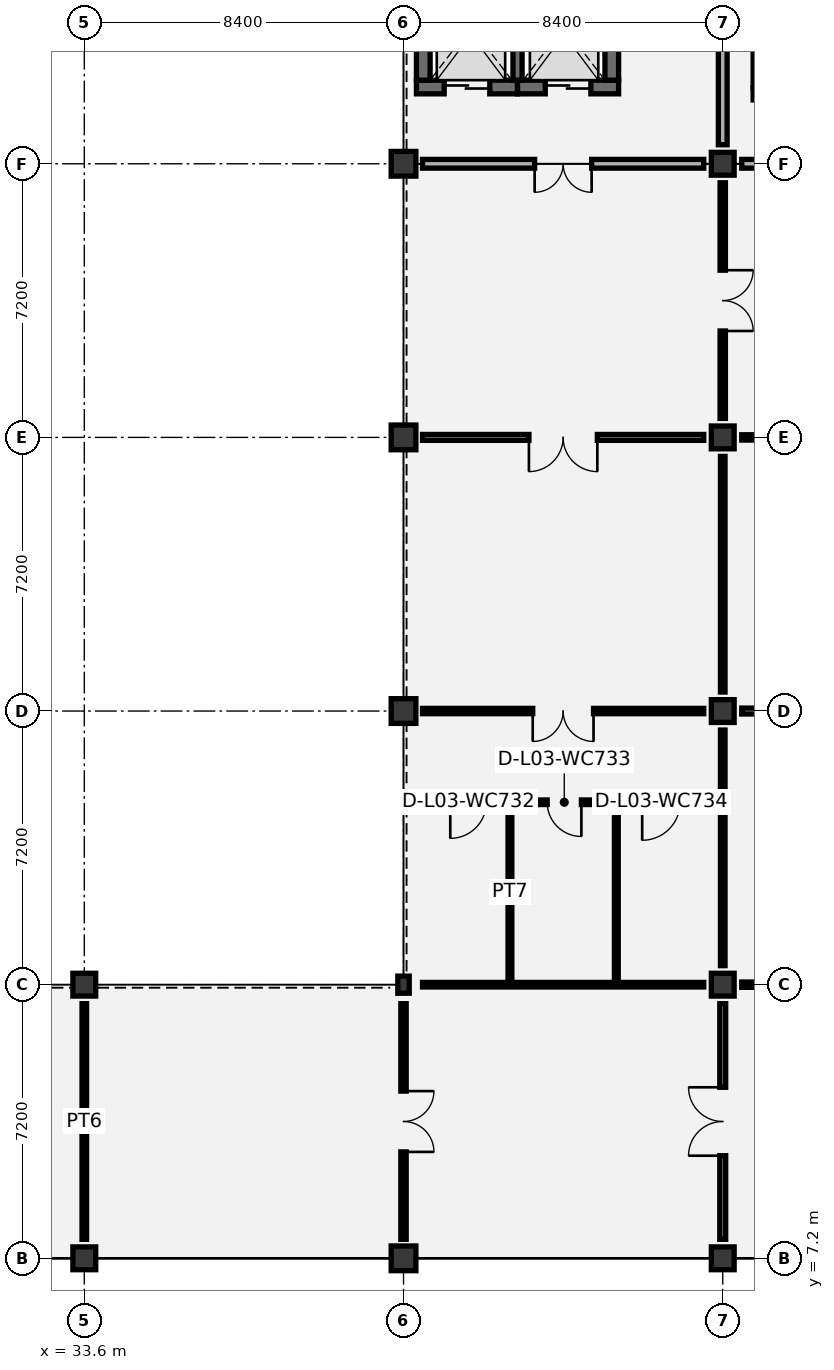
"""IFC4 building model, lengths in metres.
Left out: names, types, materials, properties, quantities, classifications, styles, units other than length and angle.
Written with IfcOpenShell. Run it as: python <this file> out.ifc"""

import sys

from ifc_helpers import new_model, si_unit, direction, frame, frame_2d, origin, origin_2d, place, context, subcontext, project, spatial, rectangle, i_section, extrude, element, fill, save


model = new_model("IFC4")
c1 = context("Model", 3, precision=1e-05, world=origin(), true_north=direction((0.0, 1.0)))
c2 = subcontext(c1, "Body", "Model", "MODEL_VIEW")
j1 = project(units=[si_unit("LENGTHUNIT", "METRE"), si_unit("PLANEANGLEUNIT", "RADIAN")], contexts=[c1])
p1 = place(None, origin())
s1 = spatial("IfcSite", under=j1, at=p1, CompositionType="ELEMENT")
p2 = place(p1, origin())
s2 = spatial("IfcBuilding", under=s1, at=p2, CompositionType="ELEMENT")
p3 = place(p2, frame((0.0, 0.0, 16.8)))
s3 = spatial("IfcBuildingStorey", under=s2, at=p3, CompositionType="ELEMENT", Elevation=16.8)
for number, where, z_axis, x_axis in (
    (1, (33.6, 7.2, 0.0), (0.0, 0.0, 1.0), (1.0, 0.0, 0.0)),
    (2, (33.6, 14.4, 0.0), (0.0, 0.0, 1.0), (1.0, 0.0, 0.0)),
):
    element("IfcColumn", number, at=place(p3, frame(where, z_axis=z_axis, x_axis=x_axis)), inside=s3, PredefinedType="COLUMN", context=c2, shape_type="SweptSolid", body=[
        extrude(rectangle(XDim=0.6, YDim=0.6, at=origin_2d()), origin(), (0.0, 0.0, 1.0), 5.05),
    ])
p4 = place(p3, frame((42.0, 7.2, 0.0), z_axis=(0.0, 0.0, 1.0), x_axis=(1.0, 0.0, 0.0)))
e3 = element("IfcColumn", 3, at=p4, inside=s3, PredefinedType="COLUMN", context=c2, shape_type="SweptSolid", body=[
    extrude(rectangle(XDim=0.65, YDim=0.65, at=origin_2d()), origin(), (0.0, 0.0, 1.0), 5.4),
])
p5 = place(p3, frame((42.0, 14.4, 0.0), z_axis=(0.0, 0.0, 1.0), x_axis=(1.0, 0.0, 0.0)))
e4 = element("IfcColumn", 4, at=p5, inside=s3, PredefinedType="COLUMN", context=c2, shape_type="SweptSolid", body=[
    extrude(i_section(OverallWidth=0.3, OverallDepth=0.45, WebThickness=0.014, FlangeThickness=0.026, FilletRadius=0.027, at=origin_2d()), origin(), (0.0, 0.0, 1.0), 5.4),
])
for number, where, z_axis, x_axis in (
    (5, (42.0, 21.6, 0.0), (0.0, 0.0, 1.0), (1.0, 0.0, 0.0)),
    (6, (42.0, 28.8, 0.0), (0.0, 0.0, 1.0), (1.0, 0.0, 0.0)),
    (7, (42.0, 36.0, 0.0), (0.0, 0.0, 1.0), (1.0, 0.0, 0.0)),
):
    element("IfcColumn", number, at=place(p3, frame(where, z_axis=z_axis, x_axis=x_axis)), inside=s3, PredefinedType="COLUMN", context=c2, shape_type="SweptSolid", body=[
        extrude(rectangle(XDim=0.65, YDim=0.65, at=origin_2d()), origin(), (0.0, 0.0, 1.0), 5.4),
    ])
for number, where, z_axis, x_axis in (
    (8, (50.4, 7.2, 0.0), (0.0, 0.0, 1.0), (1.0, 0.0, 0.0)),
    (9, (50.4, 14.4, 0.0), (0.0, 0.0, 1.0), (1.0, 0.0, 0.0)),
    (10, (50.4, 21.6, 0.0), (0.0, 0.0, 1.0), (1.0, 0.0, 0.0)),
    (11, (50.4, 28.8, 0.0), (0.0, 0.0, 1.0), (1.0, 0.0, 0.0)),
    (12, (50.4, 36.0, 0.0), (0.0, 0.0, 1.0), (1.0, 0.0, 0.0)),
):
    element("IfcColumn", number, at=place(p3, frame(where, z_axis=z_axis, x_axis=x_axis)), inside=s3, PredefinedType="COLUMN", context=c2, shape_type="SweptSolid", body=[
        extrude(rectangle(XDim=0.6, YDim=0.6, at=origin_2d()), origin(), (0.0, 0.0, 1.0), 5.05),
    ])
p6 = place(p3, frame((51.2, 37.84, 0.0), z_axis=(0.0, 0.0, 1.0), x_axis=(1.0, 0.0, 0.0)))
e13 = element("IfcWall", 13, at=p6, inside=s3, PredefinedType="SHEAR", context=c2, shape_type="SweptSolid", body=[
    extrude(rectangle(XDim=7.48, YDim=0.32, at=frame_2d((3.74, 0.0))), origin(), (0.0, 0.0, 1.0), 4.825),
])
p7 = place(p6, frame((0.45, 0.0, 0.0)))
e14 = element("IfcOpeningElement", 14, at=p7, cuts=e13, PredefinedType="OPENING", context=c2, shape_type="SweptSolid", body=[
    extrude(rectangle(XDim=1.05, YDim=2.15, at=frame_2d((0.525, 1.075))), frame((0.0, 0.17, 0.0), z_axis=(0.0, -1.0, 0.0), x_axis=(1.0, 0.0, 0.0)), (0.0, 0.0, 1.0), 0.34),
])
p8 = place(p3, frame((51.36, 38.0, 0.0), z_axis=(0.0, 0.0, 1.0), x_axis=(0.0, 1.0, 0.0)))
e15 = element("IfcWall", 15, at=p8, inside=s3, PredefinedType="SHEAR", context=c2, shape_type="SweptSolid", body=[
    extrude(rectangle(XDim=3.8, YDim=0.32, at=frame_2d((1.9, 0.0))), origin(), (0.0, 0.0, 1.0), 4.825),
])
p9 = place(p3, frame((42.34, 38.02, 0.0), z_axis=(0.0, 0.0, 1.0), x_axis=(1.0, 0.0, 0.0)))
e16 = element("IfcWall", 16, at=p9, inside=s3, PredefinedType="SHEAR", context=c2, shape_type="SweptSolid", body=[
    extrude(rectangle(XDim=2.66, YDim=0.36, at=frame_2d((1.33, 0.0))), origin(), (0.0, 0.0, 1.0), 6.5),
])
p10 = place(p9, frame((0.73, 0.0, 0.0)))
e17 = element("IfcOpeningElement", 17, at=p10, cuts=e16, PredefinedType="OPENING", context=c2, shape_type="SweptSolid", body=[
    extrude(rectangle(XDim=1.2, YDim=2.15, at=frame_2d((0.6, 1.075))), frame((0.0, 0.19, 0.0), z_axis=(0.0, -1.0, 0.0), x_axis=(1.0, 0.0, 0.0)), (0.0, 0.0, 1.0), 0.38),
])
p11 = place(p3, frame((45.0, 38.02, 0.0), z_axis=(0.0, 0.0, 1.0), x_axis=(1.0, 0.0, 0.0)))
e18 = element("IfcWall", 18, at=p11, inside=s3, PredefinedType="SHEAR", context=c2, shape_type="SweptSolid", body=[
    extrude(rectangle(XDim=2.66, YDim=0.36, at=frame_2d((1.33, 0.0))), origin(), (0.0, 0.0, 1.0), 6.5),
])
p12 = place(p11, frame((0.73, 0.0, 0.0)))
e19 = element("IfcOpeningElement", 19, at=p12, cuts=e18, PredefinedType="OPENING", context=c2, shape_type="SweptSolid", body=[
    extrude(rectangle(XDim=1.2, YDim=2.15, at=frame_2d((0.6, 1.075))), frame((0.0, 0.19, 0.0), z_axis=(0.0, -1.0, 0.0), x_axis=(1.0, 0.0, 0.0)), (0.0, 0.0, 1.0), 0.38),
])
for number, where, z_axis, x_axis in (
    (20, (42.52, 38.2, 0.0), (0.0, 0.0, 1.0), (0.0, 1.0, 0.0)),
    (21, (47.48, 38.2, 0.0), (0.0, 0.0, 1.0), (0.0, 1.0, 0.0)),
):
    element("IfcWall", number, at=place(p3, frame(where, z_axis=z_axis, x_axis=x_axis)), inside=s3, PredefinedType="SHEAR", context=c2, shape_type="SweptSolid", body=[
        extrude(rectangle(XDim=2.8, YDim=0.36, at=frame_2d((1.4, 0.0))), origin(), (0.0, 0.0, 1.0), 6.5),
    ])
p13 = place(p3, frame((45.0, 38.2, 0.0), z_axis=(0.0, 0.0, 1.0), x_axis=(0.0, 1.0, 0.0)))
e22 = element("IfcWall", 22, at=p13, inside=s3, PredefinedType="SHEAR", context=c2, shape_type="SweptSolid", body=[
    extrude(rectangle(XDim=2.8, YDim=0.24, at=frame_2d((1.4, 0.0))), origin(), (0.0, 0.0, 1.0), 6.5),
])
p14 = place(p3, frame((42.15, 19.2, 0.0), z_axis=(0.0, 0.0, 1.0), x_axis=(1.0, 0.0, 0.0)))
e23 = element("IfcWall", 23, at=p14, inside=s3, PredefinedType="PARTITIONING", context=c2, shape_type="SweptSolid", body=[
    extrude(rectangle(XDim=8.1, YDim=0.12, at=frame_2d((4.05, 0.0))), origin(), (0.0, 0.0, 1.0), 4.825),
])
p15 = place(p14, frame((1.08, 0.0, 0.0)))
e24 = element("IfcOpeningElement", 24, at=p15, cuts=e23, PredefinedType="OPENING", context=c2, shape_type="SweptSolid", body=[
    extrude(rectangle(XDim=0.95, YDim=2.1, at=frame_2d((0.475, 1.05))), frame((0.0, 0.07, 0.0), z_axis=(0.0, -1.0, 0.0), x_axis=(1.0, 0.0, 0.0)), (0.0, 0.0, 1.0), 0.14),
])
p16 = place(p14, frame((3.63, 0.0, 0.0)))
e25 = element("IfcOpeningElement", 25, at=p16, cuts=e23, PredefinedType="OPENING", context=c2, shape_type="SweptSolid", body=[
    extrude(rectangle(XDim=0.9, YDim=2.1, at=frame_2d((0.45, 1.05))), frame((0.0, 0.07, 0.0), z_axis=(0.0, -1.0, 0.0), x_axis=(1.0, 0.0, 0.0)), (0.0, 0.0, 1.0), 0.14),
])
p17 = place(p14, frame((6.13, 0.0, 0.0)))
e26 = element("IfcOpeningElement", 26, at=p17, cuts=e23, PredefinedType="OPENING", context=c2, shape_type="SweptSolid", body=[
    extrude(rectangle(XDim=1.0, YDim=2.1, at=frame_2d((0.5, 1.05))), frame((0.0, 0.07, 0.0), z_axis=(0.0, -1.0, 0.0), x_axis=(1.0, 0.0, 0.0)), (0.0, 0.0, 1.0), 0.14),
])
for number, where, z_axis, x_axis in (
    (27, (44.8, 14.55, 0.0), (0.0, 0.0, 1.0), (0.0, 1.0, 0.0)),
    (28, (47.6, 14.55, 0.0), (0.0, 0.0, 1.0), (0.0, 1.0, 0.0)),
):
    element("IfcWall", number, at=place(p3, frame(where, z_axis=z_axis, x_axis=x_axis)), inside=s3, PredefinedType="PARTITIONING", context=c2, shape_type="SweptSolid", body=[
        extrude(rectangle(XDim=4.59, YDim=0.1, at=frame_2d((2.295, 0.0))), origin(), (0.0, 0.0, 1.0), 4.825),
    ])
p18 = place(p3, frame((33.6, 7.7, 0.0), z_axis=(0.0, 0.0, 1.0), x_axis=(0.0, 1.0, 0.0)))
e29 = element("IfcWall", 29, at=p18, inside=s3, PredefinedType="PARTITIONING", context=c2, shape_type="SweptSolid", body=[
    extrude(rectangle(XDim=6.2, YDim=0.12, at=frame_2d((3.1, 0.0))), origin(), (0.0, 0.0, 1.0), 4.53),
])
p19 = place(p3, frame((42.0, 7.7, 0.0), z_axis=(0.0, 0.0, 1.0), x_axis=(0.0, 1.0, 0.0)))
e30 = element("IfcWall", 30, at=p19, inside=s3, PredefinedType="PARTITIONING", context=c2, shape_type="SweptSolid", body=[
    extrude(rectangle(XDim=6.2, YDim=0.14, at=frame_2d((3.1, 0.0))), origin(), (0.0, 0.0, 1.0), 4.12),
])
p20 = place(p19, frame((2.3, 0.0, 0.0)))
e31 = element("IfcOpeningElement", 31, at=p20, cuts=e30, PredefinedType="OPENING", context=c2, shape_type="SweptSolid", body=[
    extrude(rectangle(XDim=1.6, YDim=2.2, at=frame_2d((0.8, 1.1))), frame((0.0, 0.08, 0.0), z_axis=(0.0, -1.0, 0.0), x_axis=(1.0, 0.0, 0.0)), (0.0, 0.0, 1.0), 0.16),
])
p21 = place(p3, frame((50.4, 7.7, 0.0), z_axis=(0.0, 0.0, 1.0), x_axis=(0.0, 1.0, 0.0)))
e32 = element("IfcWall", 32, at=p21, inside=s3, PredefinedType="PARTITIONING", context=c2, shape_type="SweptSolid", body=[
    extrude(rectangle(XDim=6.2, YDim=0.155, at=frame_2d((3.1, 0.0))), origin(), (0.0, 0.0, 1.0), 4.32),
])
p22 = place(p21, frame((2.2, 0.0, 0.0)))
e33 = element("IfcOpeningElement", 33, at=p22, cuts=e32, PredefinedType="OPENING", context=c2, shape_type="SweptSolid", body=[
    extrude(rectangle(XDim=1.8, YDim=2.25, at=frame_2d((0.9, 1.125))), frame((0.0, 0.087, 0.0), z_axis=(0.0, -1.0, 0.0), x_axis=(1.0, 0.0, 0.0)), (0.0, 0.0, 1.0), 0.175),
])
p23 = place(p3, frame((42.5, 14.4, 0.0), z_axis=(0.0, 0.0, 1.0), x_axis=(1.0, 0.0, 0.0)))
e34 = element("IfcWall", 34, at=p23, inside=s3, PredefinedType="PARTITIONING", context=c2, shape_type="SweptSolid", body=[
    extrude(rectangle(XDim=7.4, YDim=0.12, at=frame_2d((3.7, 0.0))), origin(), (0.0, 0.0, 1.0), 4.07),
])
p24 = place(p3, frame((50.4, 14.9, 0.0), z_axis=(0.0, 0.0, 1.0), x_axis=(0.0, 1.0, 0.0)))
e35 = element("IfcWall", 35, at=p24, inside=s3, PredefinedType="PARTITIONING", context=c2, shape_type="SweptSolid", body=[
    extrude(rectangle(XDim=6.2, YDim=0.12, at=frame_2d((3.1, 0.0))), origin(), (0.0, 0.0, 1.0), 4.12),
])
p25 = place(p3, frame((42.5, 21.6, 0.0), z_axis=(0.0, 0.0, 1.0), x_axis=(1.0, 0.0, 0.0)))
e36 = element("IfcWall", 36, at=p25, inside=s3, PredefinedType="PARTITIONING", context=c2, shape_type="SweptSolid", body=[
    extrude(rectangle(XDim=7.4, YDim=0.14, at=frame_2d((3.7, 0.0))), origin(), (0.0, 0.0, 1.0), 4.07),
])
p26 = place(p25, frame((2.9, 0.0, 0.0)))
e37 = element("IfcOpeningElement", 37, at=p26, cuts=e36, PredefinedType="OPENING", context=c2, shape_type="SweptSolid", body=[
    extrude(rectangle(XDim=1.6, YDim=2.2, at=frame_2d((0.8, 1.1))), frame((0.0, 0.08, 0.0), z_axis=(0.0, -1.0, 0.0), x_axis=(1.0, 0.0, 0.0)), (0.0, 0.0, 1.0), 0.16),
])
p27 = place(p3, frame((50.4, 22.1, 0.0), z_axis=(0.0, 0.0, 1.0), x_axis=(0.0, 1.0, 0.0)))
e38 = element("IfcWall", 38, at=p27, inside=s3, PredefinedType="PARTITIONING", context=c2, shape_type="SweptSolid", body=[
    extrude(rectangle(XDim=6.2, YDim=0.12, at=frame_2d((3.1, 0.0))), origin(), (0.0, 0.0, 1.0), 4.42),
])
p28 = place(p3, frame((42.5, 28.8, 0.0), z_axis=(0.0, 0.0, 1.0), x_axis=(1.0, 0.0, 0.0)))
e39 = element("IfcWall", 39, at=p28, inside=s3, PredefinedType="PARTITIONING", context=c2, shape_type="SweptSolid", body=[
    extrude(rectangle(XDim=7.4, YDim=0.155, at=frame_2d((3.7, 0.0))), origin(), (0.0, 0.0, 1.0), 4.07),
])
p29 = place(p28, frame((2.8, 0.0, 0.0)))
e40 = element("IfcOpeningElement", 40, at=p29, cuts=e39, PredefinedType="OPENING", context=c2, shape_type="SweptSolid", body=[
    extrude(rectangle(XDim=1.8, YDim=2.25, at=frame_2d((0.9, 1.125))), frame((0.0, 0.087, 0.0), z_axis=(0.0, -1.0, 0.0), x_axis=(1.0, 0.0, 0.0)), (0.0, 0.0, 1.0), 0.175),
])
p30 = place(p3, frame((50.4, 29.3, 0.0), z_axis=(0.0, 0.0, 1.0), x_axis=(0.0, 1.0, 0.0)))
e41 = element("IfcWall", 41, at=p30, inside=s3, PredefinedType="PARTITIONING", context=c2, shape_type="SweptSolid", body=[
    extrude(rectangle(XDim=6.2, YDim=0.14, at=frame_2d((3.1, 0.0))), origin(), (0.0, 0.0, 1.0), 4.12),
])
p31 = place(p30, frame((2.3, 0.0, 0.0)))
e42 = element("IfcOpeningElement", 42, at=p31, cuts=e41, PredefinedType="OPENING", context=c2, shape_type="SweptSolid", body=[
    extrude(rectangle(XDim=1.6, YDim=2.2, at=frame_2d((0.8, 1.1))), frame((0.0, 0.08, 0.0), z_axis=(0.0, -1.0, 0.0), x_axis=(1.0, 0.0, 0.0)), (0.0, 0.0, 1.0), 0.16),
])
p32 = place(p3, frame((42.5, 36.0, 0.0), z_axis=(0.0, 0.0, 1.0), x_axis=(1.0, 0.0, 0.0)))
e43 = element("IfcWall", 43, at=p32, inside=s3, PredefinedType="PARTITIONING", context=c2, shape_type="SweptSolid", body=[
    extrude(rectangle(XDim=7.4, YDim=0.23, at=frame_2d((3.7, 0.0))), origin(), (0.0, 0.0, 1.0), 4.07),
])
p33 = place(p32, frame((2.95, 0.0, 0.0)))
e44 = element("IfcOpeningElement", 44, at=p33, cuts=e43, PredefinedType="OPENING", context=c2, shape_type="SweptSolid", body=[
    extrude(rectangle(XDim=1.5, YDim=2.15, at=frame_2d((0.75, 1.075))), frame((0.0, 0.125, 0.0), z_axis=(0.0, -1.0, 0.0), x_axis=(1.0, 0.0, 0.0)), (0.0, 0.0, 1.0), 0.25),
])
p34 = place(p3, frame((50.4, 36.5, 0.0), z_axis=(0.0, 0.0, 1.0), x_axis=(0.0, 1.0, 0.0)))
e45 = element("IfcWall", 45, at=p34, inside=s3, PredefinedType="PARTITIONING", context=c2, shape_type="SweptSolid", body=[
    extrude(rectangle(XDim=6.2, YDim=0.23, at=frame_2d((3.1, 0.0))), origin(), (0.0, 0.0, 1.0), 4.53),
])
p35 = place(p3, frame((50.9, 14.4, 0.0), z_axis=(0.0, 0.0, 1.0), x_axis=(1.0, 0.0, 0.0)))
e46 = element("IfcWall", 46, at=p35, inside=s3, PredefinedType="PARTITIONING", context=c2, shape_type="SweptSolid", body=[
    extrude(rectangle(XDim=7.4, YDim=0.14, at=frame_2d((3.7, 0.0))), origin(), (0.0, 0.0, 1.0), 4.07),
])
p36 = place(p35, frame((2.9, 0.0, 0.0)))
e47 = element("IfcOpeningElement", 47, at=p36, cuts=e46, PredefinedType="OPENING", context=c2, shape_type="SweptSolid", body=[
    extrude(rectangle(XDim=1.6, YDim=2.2, at=frame_2d((0.8, 1.1))), frame((0.0, 0.08, 0.0), z_axis=(0.0, -1.0, 0.0), x_axis=(1.0, 0.0, 0.0)), (0.0, 0.0, 1.0), 0.16),
])
p37 = place(p3, frame((50.9, 21.6, 0.0), z_axis=(0.0, 0.0, 1.0), x_axis=(1.0, 0.0, 0.0)))
e48 = element("IfcWall", 48, at=p37, inside=s3, PredefinedType="PARTITIONING", context=c2, shape_type="SweptSolid", body=[
    extrude(rectangle(XDim=7.4, YDim=0.155, at=frame_2d((3.7, 0.0))), origin(), (0.0, 0.0, 1.0), 4.07),
])
p38 = place(p37, frame((2.8, 0.0, 0.0)))
e49 = element("IfcOpeningElement", 49, at=p38, cuts=e48, PredefinedType="OPENING", context=c2, shape_type="SweptSolid", body=[
    extrude(rectangle(XDim=1.8, YDim=2.25, at=frame_2d((0.9, 1.125))), frame((0.0, 0.087, 0.0), z_axis=(0.0, -1.0, 0.0), x_axis=(1.0, 0.0, 0.0)), (0.0, 0.0, 1.0), 0.175),
])
p39 = place(p3, frame((50.9, 28.8, 0.0), z_axis=(0.0, 0.0, 1.0), x_axis=(1.0, 0.0, 0.0)))
e50 = element("IfcWall", 50, at=p39, inside=s3, PredefinedType="PARTITIONING", context=c2, shape_type="SweptSolid", body=[
    extrude(rectangle(XDim=7.4, YDim=0.14, at=frame_2d((3.7, 0.0))), origin(), (0.0, 0.0, 1.0), 4.07),
])
p40 = place(p39, frame((2.9, 0.0, 0.0)))
e51 = element("IfcOpeningElement", 51, at=p40, cuts=e50, PredefinedType="OPENING", context=c2, shape_type="SweptSolid", body=[
    extrude(rectangle(XDim=1.6, YDim=2.2, at=frame_2d((0.8, 1.1))), frame((0.0, 0.08, 0.0), z_axis=(0.0, -1.0, 0.0), x_axis=(1.0, 0.0, 0.0)), (0.0, 0.0, 1.0), 0.16),
])
p41 = place(p3, frame((50.9, 36.0, 0.0), z_axis=(0.0, 0.0, 1.0), x_axis=(1.0, 0.0, 0.0)))
e52 = element("IfcWall", 52, at=p41, inside=s3, PredefinedType="PARTITIONING", context=c2, shape_type="SweptSolid", body=[
    extrude(rectangle(XDim=7.4, YDim=0.23, at=frame_2d((3.7, 0.0))), origin(), (0.0, 0.0, 1.0), 4.07),
])
p42 = place(p41, frame((2.95, 0.0, 0.0)))
e53 = element("IfcOpeningElement", 53, at=p42, cuts=e52, PredefinedType="OPENING", context=c2, shape_type="SweptSolid", body=[
    extrude(rectangle(XDim=1.5, YDim=2.15, at=frame_2d((0.75, 1.075))), frame((0.0, 0.125, 0.0), z_axis=(0.0, -1.0, 0.0), x_axis=(1.0, 0.0, 0.0)), (0.0, 0.0, 1.0), 0.25),
])
p43 = place(p10, origin())
e54 = element("IfcDoor", 54, at=p43, inside=s3, OperationType="DOUBLE_DOOR_SLIDING", PredefinedType="DOOR", context=c2, shape_type="SweptSolid", body=[
    extrude(rectangle(XDim=1.2, YDim=2.15, at=frame_2d((0.6, 1.075))), frame((0.0, 0.025, 0.0), z_axis=(0.0, -1.0, 0.0), x_axis=(1.0, 0.0, 0.0)), (0.0, 0.0, 1.0), 0.05),
])
fill(e17, e54)
p44 = place(p12, origin())
e55 = element("IfcDoor", 55, at=p44, inside=s3, OperationType="DOUBLE_DOOR_SLIDING", PredefinedType="DOOR", context=c2, shape_type="SweptSolid", body=[
    extrude(rectangle(XDim=1.2, YDim=2.15, at=frame_2d((0.6, 1.075))), frame((0.0, 0.025, 0.0), z_axis=(0.0, -1.0, 0.0), x_axis=(1.0, 0.0, 0.0)), (0.0, 0.0, 1.0), 0.05),
])
fill(e19, e55)
p45 = place(p15, frame((0.95, 0.0, 0.0), z_axis=(0.0, 0.0, 1.0), x_axis=(-1.0, 0.0, 0.0)))
e56 = element("IfcDoor", 56, at=p45, inside=s3, OperationType="SINGLE_SWING_RIGHT", PredefinedType="DOOR", context=c2, shape_type="SweptSolid", body=[
    extrude(rectangle(XDim=0.95, YDim=2.1, at=frame_2d((0.475, 1.05))), frame((0.0, 0.025, 0.0), z_axis=(0.0, -1.0, 0.0), x_axis=(1.0, 0.0, 0.0)), (0.0, 0.0, 1.0), 0.05),
])
fill(e24, e56)
p46 = place(p16, frame((0.9, 0.0, 0.0), z_axis=(0.0, 0.0, 1.0), x_axis=(-1.0, 0.0, 0.0)))
e57 = element("IfcDoor", 57, at=p46, inside=s3, OperationType="SINGLE_SWING_LEFT", PredefinedType="DOOR", context=c2, shape_type="SweptSolid", body=[
    extrude(rectangle(XDim=0.9, YDim=2.1, at=frame_2d((0.45, 1.05))), frame((0.0, 0.025, 0.0), z_axis=(0.0, -1.0, 0.0), x_axis=(1.0, 0.0, 0.0)), (0.0, 0.0, 1.0), 0.05),
])
fill(e25, e57)
p47 = place(p17, frame((1.0, 0.0, 0.0), z_axis=(0.0, 0.0, 1.0), x_axis=(-1.0, 0.0, 0.0)))
e58 = element("IfcDoor", 58, at=p47, inside=s3, OperationType="SINGLE_SWING_RIGHT", PredefinedType="DOOR", context=c2, shape_type="SweptSolid", body=[
    extrude(rectangle(XDim=1.0, YDim=2.1, at=frame_2d((0.5, 1.05))), frame((0.0, 0.025, 0.0), z_axis=(0.0, -1.0, 0.0), x_axis=(1.0, 0.0, 0.0)), (0.0, 0.0, 1.0), 0.05),
])
fill(e26, e58)
p48 = place(p20, frame((1.6, 0.0, 0.0), z_axis=(0.0, 0.0, 1.0), x_axis=(-1.0, 0.0, 0.0)))
e59 = element("IfcDoor", 59, at=p48, inside=s3, OperationType="DOUBLE_DOOR_SINGLE_SWING", PredefinedType="DOOR", context=c2, shape_type="SweptSolid", body=[
    extrude(rectangle(XDim=1.6, YDim=2.2, at=frame_2d((0.8, 1.1))), frame((0.0, 0.025, 0.0), z_axis=(0.0, -1.0, 0.0), x_axis=(1.0, 0.0, 0.0)), (0.0, 0.0, 1.0), 0.05),
])
fill(e31, e59)
p49 = place(p22, origin())
e60 = element("IfcDoor", 60, at=p49, inside=s3, OperationType="DOUBLE_DOOR_SINGLE_SWING", PredefinedType="DOOR", context=c2, shape_type="SweptSolid", body=[
    extrude(rectangle(XDim=1.8, YDim=2.25, at=frame_2d((0.9, 1.125))), frame((0.0, 0.025, 0.0), z_axis=(0.0, -1.0, 0.0), x_axis=(1.0, 0.0, 0.0)), (0.0, 0.0, 1.0), 0.05),
])
fill(e33, e60)
p50 = place(p26, frame((1.6, 0.0, 0.0), z_axis=(0.0, 0.0, 1.0), x_axis=(-1.0, 0.0, 0.0)))
e61 = element("IfcDoor", 61, at=p50, inside=s3, OperationType="DOUBLE_DOOR_SINGLE_SWING", PredefinedType="DOOR", context=c2, shape_type="SweptSolid", body=[
    extrude(rectangle(XDim=1.6, YDim=2.2, at=frame_2d((0.8, 1.1))), frame((0.0, 0.025, 0.0), z_axis=(0.0, -1.0, 0.0), x_axis=(1.0, 0.0, 0.0)), (0.0, 0.0, 1.0), 0.05),
])
fill(e37, e61)
p51 = place(p29, frame((1.8, 0.0, 0.0), z_axis=(0.0, 0.0, 1.0), x_axis=(-1.0, 0.0, 0.0)))
e62 = element("IfcDoor", 62, at=p51, inside=s3, OperationType="DOUBLE_DOOR_SINGLE_SWING", PredefinedType="DOOR", context=c2, shape_type="SweptSolid", body=[
    extrude(rectangle(XDim=1.8, YDim=2.25, at=frame_2d((0.9, 1.125))), frame((0.0, 0.025, 0.0), z_axis=(0.0, -1.0, 0.0), x_axis=(1.0, 0.0, 0.0)), (0.0, 0.0, 1.0), 0.05),
])
fill(e40, e62)
p52 = place(p31, frame((1.6, 0.0, 0.0), z_axis=(0.0, 0.0, 1.0), x_axis=(-1.0, 0.0, 0.0)))
e63 = element("IfcDoor", 63, at=p52, inside=s3, OperationType="DOUBLE_DOOR_SINGLE_SWING", PredefinedType="DOOR", context=c2, shape_type="SweptSolid", body=[
    extrude(rectangle(XDim=1.6, YDim=2.2, at=frame_2d((0.8, 1.1))), frame((0.0, 0.025, 0.0), z_axis=(0.0, -1.0, 0.0), x_axis=(1.0, 0.0, 0.0)), (0.0, 0.0, 1.0), 0.05),
])
fill(e42, e63)
p53 = place(p33, frame((1.5, 0.0, 0.0), z_axis=(0.0, 0.0, 1.0), x_axis=(-1.0, 0.0, 0.0)))
e64 = element("IfcDoor", 64, at=p53, inside=s3, OperationType="DOUBLE_DOOR_SINGLE_SWING", PredefinedType="DOOR", context=c2, shape_type="SweptSolid", body=[
    extrude(rectangle(XDim=1.5, YDim=2.15, at=frame_2d((0.75, 1.075))), frame((0.0, 0.025, 0.0), z_axis=(0.0, -1.0, 0.0), x_axis=(1.0, 0.0, 0.0)), (0.0, 0.0, 1.0), 0.05),
])
fill(e44, e64)
save(model, sys.argv[1])
